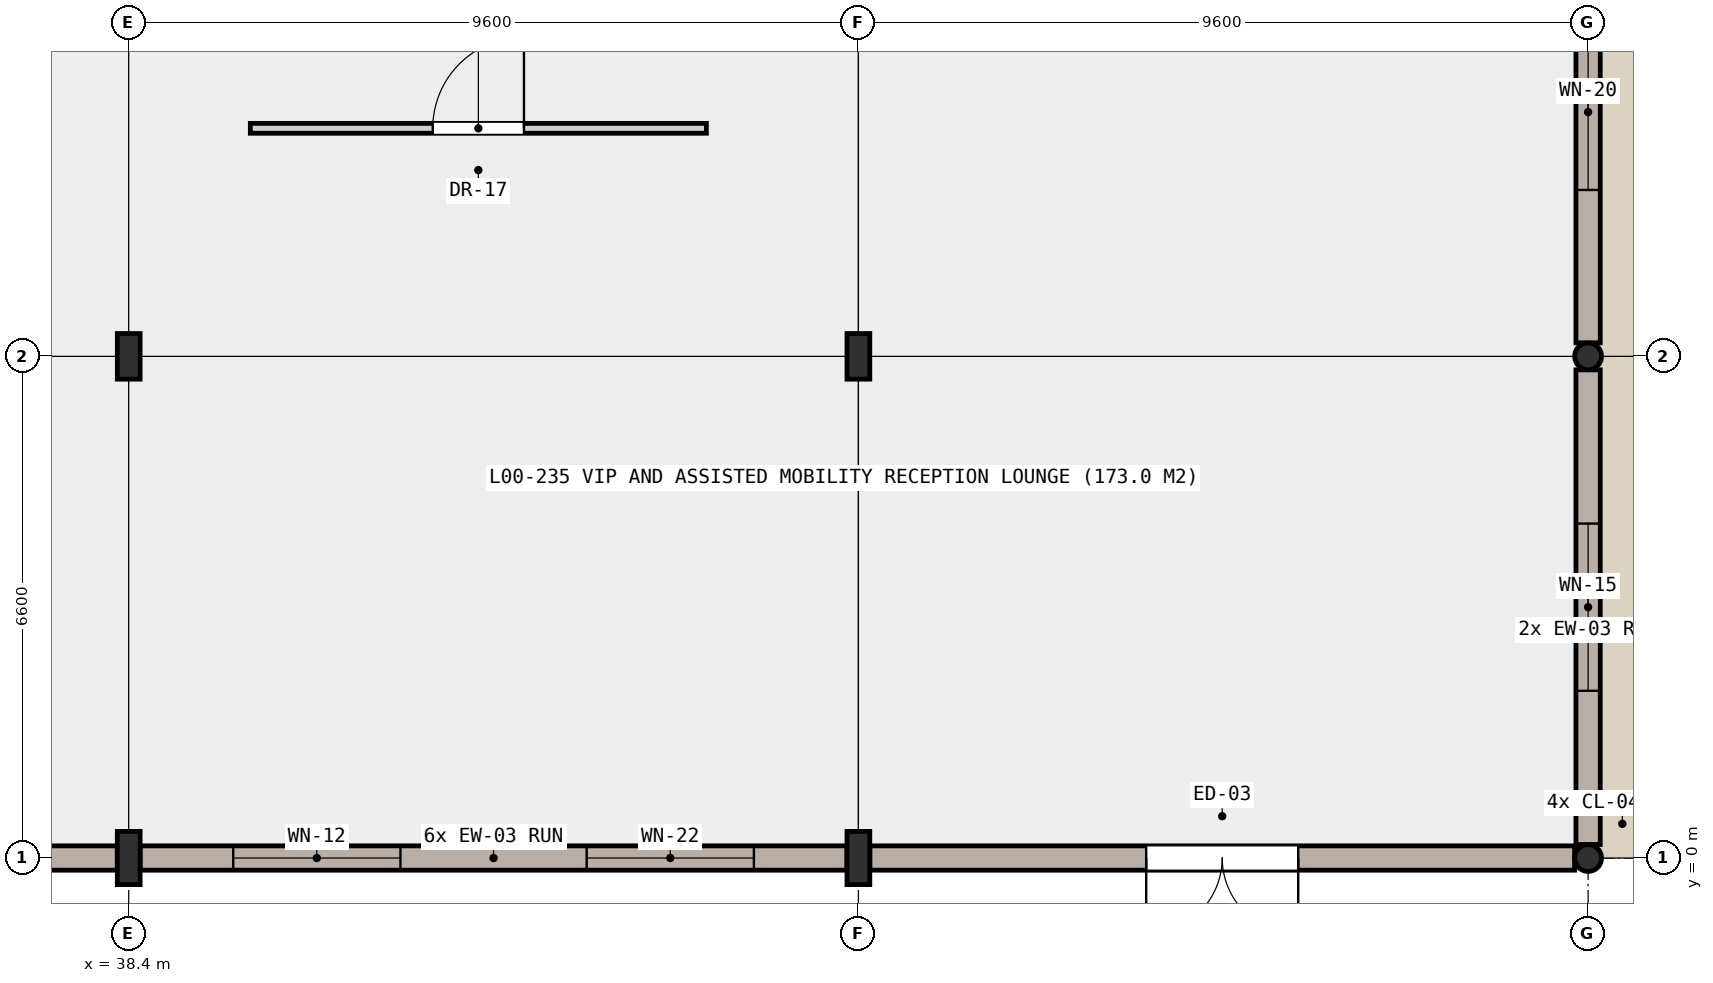
"""IFC4 building model, lengths in metres.
Left out: names, types, materials, properties, quantities, classifications, styles, units other than length and angle.
Written with IfcOpenShell. Run it as: python <this file> out.ifc"""

import sys

from ifc_helpers import new_model, si_unit, direction, frame, frame_2d, origin, origin_2d, place, context, subcontext, project, spatial, rectangle, hollow_circle, i_section, extrude, element, fill, save


model = new_model("IFC4")
c1 = context("Model", 3, precision=1e-05, world=origin(), true_north=direction((0.0, 1.0)))
c2 = subcontext(c1, "Body", "Model", "MODEL_VIEW")
j1 = project(units=[si_unit("LENGTHUNIT", "METRE"), si_unit("PLANEANGLEUNIT", "RADIAN")], contexts=[c1])
p1 = place(None, origin())
s1 = spatial("IfcSite", under=j1, at=p1, CompositionType="ELEMENT")
p2 = place(p1, origin())
s2 = spatial("IfcBuilding", under=s1, at=p2, CompositionType="ELEMENT")
p3 = place(p2, origin())
s3 = spatial("IfcBuildingStorey", under=s2, at=p3, CompositionType="ELEMENT", Elevation=0.0)
p4 = place(p3, frame((38.4, 0.0, 0.0), z_axis=(0.0, 0.0, 1.0), x_axis=(1.0, 0.0, 0.0)))
e1 = element("IfcColumn", 1, at=p4, inside=s3, PredefinedType="COLUMN", context=c2, shape_type="SweptSolid", body=[
    extrude(i_section(OverallWidth=0.3, OverallDepth=0.7, WebThickness=0.017, FlangeThickness=0.032, FilletRadius=0.027, at=origin_2d()), origin(), (0.0, 0.0, 1.0), 5.4),
])
p5 = place(p3, frame((38.4, 6.6, 0.0), z_axis=(0.0, 0.0, 1.0), x_axis=(1.0, 0.0, 0.0)))
e2 = element("IfcColumn", 2, at=p5, inside=s3, PredefinedType="COLUMN", context=c2, shape_type="SweptSolid", body=[
    extrude(i_section(OverallWidth=0.3, OverallDepth=0.6, WebThickness=0.015, FlangeThickness=0.03, FilletRadius=0.027, at=origin_2d()), origin(), (0.0, 0.0, 1.0), 5.4),
])
p6 = place(p3, frame((48.0, 0.0, 0.0), z_axis=(0.0, 0.0, 1.0), x_axis=(1.0, 0.0, 0.0)))
e3 = element("IfcColumn", 3, at=p6, inside=s3, PredefinedType="COLUMN", context=c2, shape_type="SweptSolid", body=[
    extrude(i_section(OverallWidth=0.3, OverallDepth=0.7, WebThickness=0.017, FlangeThickness=0.032, FilletRadius=0.027, at=origin_2d()), origin(), (0.0, 0.0, 1.0), 5.4),
])
p7 = place(p3, frame((48.0, 6.6, 0.0), z_axis=(0.0, 0.0, 1.0), x_axis=(1.0, 0.0, 0.0)))
e4 = element("IfcColumn", 4, at=p7, inside=s3, PredefinedType="COLUMN", context=c2, shape_type="SweptSolid", body=[
    extrude(i_section(OverallWidth=0.3, OverallDepth=0.6, WebThickness=0.015, FlangeThickness=0.03, FilletRadius=0.027, at=origin_2d()), origin(), (0.0, 0.0, 1.0), 5.4),
])
for number, where, z_axis, x_axis in (
    (5, (57.6, 0.0, 0.0), (0.0, 0.0, 1.0), (1.0, 0.0, 0.0)),
    (6, (57.6, 6.6, 0.0), (0.0, 0.0, 1.0), (1.0, 0.0, 0.0)),
):
    element("IfcColumn", number, at=place(p3, frame(where, z_axis=z_axis, x_axis=x_axis)), inside=s3, PredefinedType="COLUMN", context=c2, shape_type="SweptSolid", body=[
        extrude(hollow_circle(Radius=0.178, WallThickness=0.016, at=origin_2d()), origin(), (0.0, 0.0, 1.0), 5.4),
    ])
p8 = place(p3, frame((57.6, 12.85, 0.0), z_axis=(0.0, 0.0, 1.0), x_axis=(0.0, -1.0, 0.0)))
e7 = element("IfcWall", 7, at=p8, inside=s3, PredefinedType="SOLIDWALL", context=c2, shape_type="SweptSolid", body=[
    extrude(rectangle(XDim=6.072, YDim=0.32, at=frame_2d((3.036, 0.0))), origin(), (0.0, 0.0, 1.0), 4.59),
])
p9 = place(p8, frame((2.011, 0.0, 0.85)))
e8 = element("IfcOpeningElement", 8, at=p9, cuts=e7, PredefinedType="OPENING", context=c2, shape_type="SweptSolid", body=[
    extrude(rectangle(XDim=2.05, YDim=2.15, at=frame_2d((1.025, 1.075))), frame((0.0, 0.17, 0.0), z_axis=(0.0, -1.0, 0.0), x_axis=(1.0, 0.0, 0.0)), (0.0, 0.0, 1.0), 0.34),
])
p10 = place(p3, frame((57.6, 6.422, 0.0), z_axis=(0.0, 0.0, 1.0), x_axis=(0.0, -1.0, 0.0)))
e9 = element("IfcWall", 9, at=p10, inside=s3, PredefinedType="SOLIDWALL", context=c2, shape_type="SweptSolid", body=[
    extrude(rectangle(XDim=6.244, YDim=0.32, at=frame_2d((3.122, 0.0))), origin(), (0.0, 0.0, 1.0), 4.59),
])
p11 = place(p10, frame((2.022, 0.0, 0.85)))
e10 = element("IfcOpeningElement", 10, at=p11, cuts=e9, PredefinedType="OPENING", context=c2, shape_type="SweptSolid", body=[
    extrude(rectangle(XDim=2.2, YDim=1.5, at=frame_2d((1.1, 0.75))), frame((0.0, 0.17, 0.0), z_axis=(0.0, -1.0, 0.0), x_axis=(1.0, 0.0, 0.0)), (0.0, 0.0, 1.0), 0.34),
])
p12 = place(p3, frame((57.422, 0.0, 0.0), z_axis=(0.0, 0.0, 1.0), x_axis=(-1.0, 0.0, 0.0)))
e11 = element("IfcWall", 11, at=p12, inside=s3, PredefinedType="SOLIDWALL", context=c2, shape_type="SweptSolid", body=[
    extrude(rectangle(XDim=9.272, YDim=0.32, at=frame_2d((4.636, 0.0))), origin(), (0.0, 0.0, 1.0), 4.69),
])
p13 = place(p12, frame((3.636, 0.0, 0.0)))
e12 = element("IfcOpeningElement", 12, at=p13, cuts=e11, PredefinedType="OPENING", context=c2, shape_type="SweptSolid", body=[
    extrude(rectangle(XDim=2.0, YDim=2.45, at=frame_2d((1.0, 1.225))), frame((0.0, 0.17, 0.0), z_axis=(0.0, -1.0, 0.0), x_axis=(1.0, 0.0, 0.0)), (0.0, 0.0, 1.0), 0.34),
])
p14 = place(p3, frame((47.85, 0.0, 0.0), z_axis=(0.0, 0.0, 1.0), x_axis=(-1.0, 0.0, 0.0)))
e13 = element("IfcWall", 13, at=p14, inside=s3, PredefinedType="SOLIDWALL", context=c2, shape_type="SweptSolid", body=[
    extrude(rectangle(XDim=9.3, YDim=0.32, at=frame_2d((4.65, 0.0))), origin(), (0.0, 0.0, 1.0), 4.69),
])
p15 = place(p14, frame((1.225, 0.0, 0.85)))
e14 = element("IfcOpeningElement", 14, at=p15, cuts=e13, PredefinedType="OPENING", context=c2, shape_type="SweptSolid", body=[
    extrude(rectangle(XDim=2.2, YDim=1.85, at=frame_2d((1.1, 0.925))), frame((0.0, 0.17, 0.0), z_axis=(0.0, -1.0, 0.0), x_axis=(1.0, 0.0, 0.0)), (0.0, 0.0, 1.0), 0.34),
])
p16 = place(p14, frame((5.875, 0.0, 0.85)))
e15 = element("IfcOpeningElement", 15, at=p16, cuts=e13, PredefinedType="OPENING", context=c2, shape_type="SweptSolid", body=[
    extrude(rectangle(XDim=2.2, YDim=2.15, at=frame_2d((1.1, 1.075))), frame((0.0, 0.17, 0.0), z_axis=(0.0, -1.0, 0.0), x_axis=(1.0, 0.0, 0.0)), (0.0, 0.0, 1.0), 0.34),
])
p17 = place(p3, frame((38.25, 0.0, 0.0), z_axis=(0.0, 0.0, 1.0), x_axis=(-1.0, 0.0, 0.0)))
e16 = element("IfcWall", 16, at=p17, inside=s3, PredefinedType="SOLIDWALL", context=c2, shape_type="SweptSolid", body=[
    extrude(rectangle(XDim=9.3, YDim=0.32, at=frame_2d((4.65, 0.0))), origin(), (0.0, 0.0, 1.0), 4.69),
])
p18 = place(p17, frame((3.675, 0.0, 0.0)))
e17 = element("IfcOpeningElement", 17, at=p18, cuts=e16, PredefinedType="OPENING", context=c2, shape_type="SweptSolid", body=[
    extrude(rectangle(XDim=1.95, YDim=2.4, at=frame_2d((0.975, 1.2))), frame((0.0, 0.17, 0.0), z_axis=(0.0, -1.0, 0.0), x_axis=(1.0, 0.0, 0.0)), (0.0, 0.0, 1.0), 0.34),
])
p19 = place(p3, frame((40.0, 9.6, 0.0), z_axis=(0.0, 0.0, 1.0), x_axis=(1.0, 0.0, 0.0)))
e18 = element("IfcWall", 18, at=p19, inside=s3, PredefinedType="PARTITIONING", context=c2, shape_type="SweptSolid", body=[
    extrude(rectangle(XDim=6.0, YDim=0.13, at=frame_2d((3.0, 0.0))), origin(), (0.0, 0.0, 1.0), 5.12),
])
p20 = place(p19, frame((2.4, 0.0, 0.0)))
e19 = element("IfcOpeningElement", 19, at=p20, cuts=e18, PredefinedType="OPENING", context=c2, shape_type="SweptSolid", body=[
    extrude(rectangle(XDim=1.2, YDim=2.15, at=frame_2d((0.6, 1.075))), frame((0.0, 0.075, 0.0), z_axis=(0.0, -1.0, 0.0), x_axis=(1.0, 0.0, 0.0)), (0.0, 0.0, 1.0), 0.15),
])
p21 = place(p9, origin())
e20 = element("IfcWindow", 20, at=p21, inside=s3, PartitioningType="SINGLE_PANEL", PredefinedType="WINDOW", context=c2, shape_type="SweptSolid", body=[
    extrude(rectangle(XDim=2.05, YDim=2.15, at=frame_2d((1.025, 1.075))), frame((0.0, 0.03, 0.0), z_axis=(0.0, -1.0, 0.0), x_axis=(1.0, 0.0, 0.0)), (0.0, 0.0, 1.0), 0.06),
])
fill(e8, e20)
p22 = place(p11, origin())
e21 = element("IfcWindow", 21, at=p22, inside=s3, PartitioningType="SINGLE_PANEL", PredefinedType="WINDOW", context=c2, shape_type="SweptSolid", body=[
    extrude(rectangle(XDim=2.2, YDim=1.5, at=frame_2d((1.1, 0.75))), frame((0.0, 0.03, 0.0), z_axis=(0.0, -1.0, 0.0), x_axis=(1.0, 0.0, 0.0)), (0.0, 0.0, 1.0), 0.06),
])
fill(e10, e21)
p23 = place(p13, origin())
e22 = element("IfcDoor", 22, at=p23, inside=s3, OperationType="DOUBLE_DOOR_SINGLE_SWING", PredefinedType="DOOR", context=c2, shape_type="SweptSolid", body=[
    extrude(rectangle(XDim=2.0, YDim=2.45, at=frame_2d((1.0, 1.225))), frame((0.0, 0.025, 0.0), z_axis=(0.0, -1.0, 0.0), x_axis=(1.0, 0.0, 0.0)), (0.0, 0.0, 1.0), 0.05),
])
fill(e12, e22)
p24 = place(p15, origin())
e23 = element("IfcWindow", 23, at=p24, inside=s3, PartitioningType="SINGLE_PANEL", PredefinedType="WINDOW", context=c2, shape_type="SweptSolid", body=[
    extrude(rectangle(XDim=2.2, YDim=1.85, at=frame_2d((1.1, 0.925))), frame((0.0, 0.03, 0.0), z_axis=(0.0, -1.0, 0.0), x_axis=(1.0, 0.0, 0.0)), (0.0, 0.0, 1.0), 0.06),
])
fill(e14, e23)
p25 = place(p16, origin())
e24 = element("IfcWindow", 24, at=p25, inside=s3, PartitioningType="SINGLE_PANEL", PredefinedType="WINDOW", context=c2, shape_type="SweptSolid", body=[
    extrude(rectangle(XDim=2.2, YDim=2.15, at=frame_2d((1.1, 1.075))), frame((0.0, 0.03, 0.0), z_axis=(0.0, -1.0, 0.0), x_axis=(1.0, 0.0, 0.0)), (0.0, 0.0, 1.0), 0.06),
])
fill(e15, e24)
p26 = place(p20, origin())
e25 = element("IfcDoor", 25, at=p26, inside=s3, OperationType="SINGLE_SWING_RIGHT", PredefinedType="DOOR", context=c2, shape_type="SweptSolid", body=[
    extrude(rectangle(XDim=1.2, YDim=2.15, at=frame_2d((0.6, 1.075))), frame((0.0, 0.025, 0.0), z_axis=(0.0, -1.0, 0.0), x_axis=(1.0, 0.0, 0.0)), (0.0, 0.0, 1.0), 0.05),
])
fill(e19, e25)
save(model, sys.argv[1])
